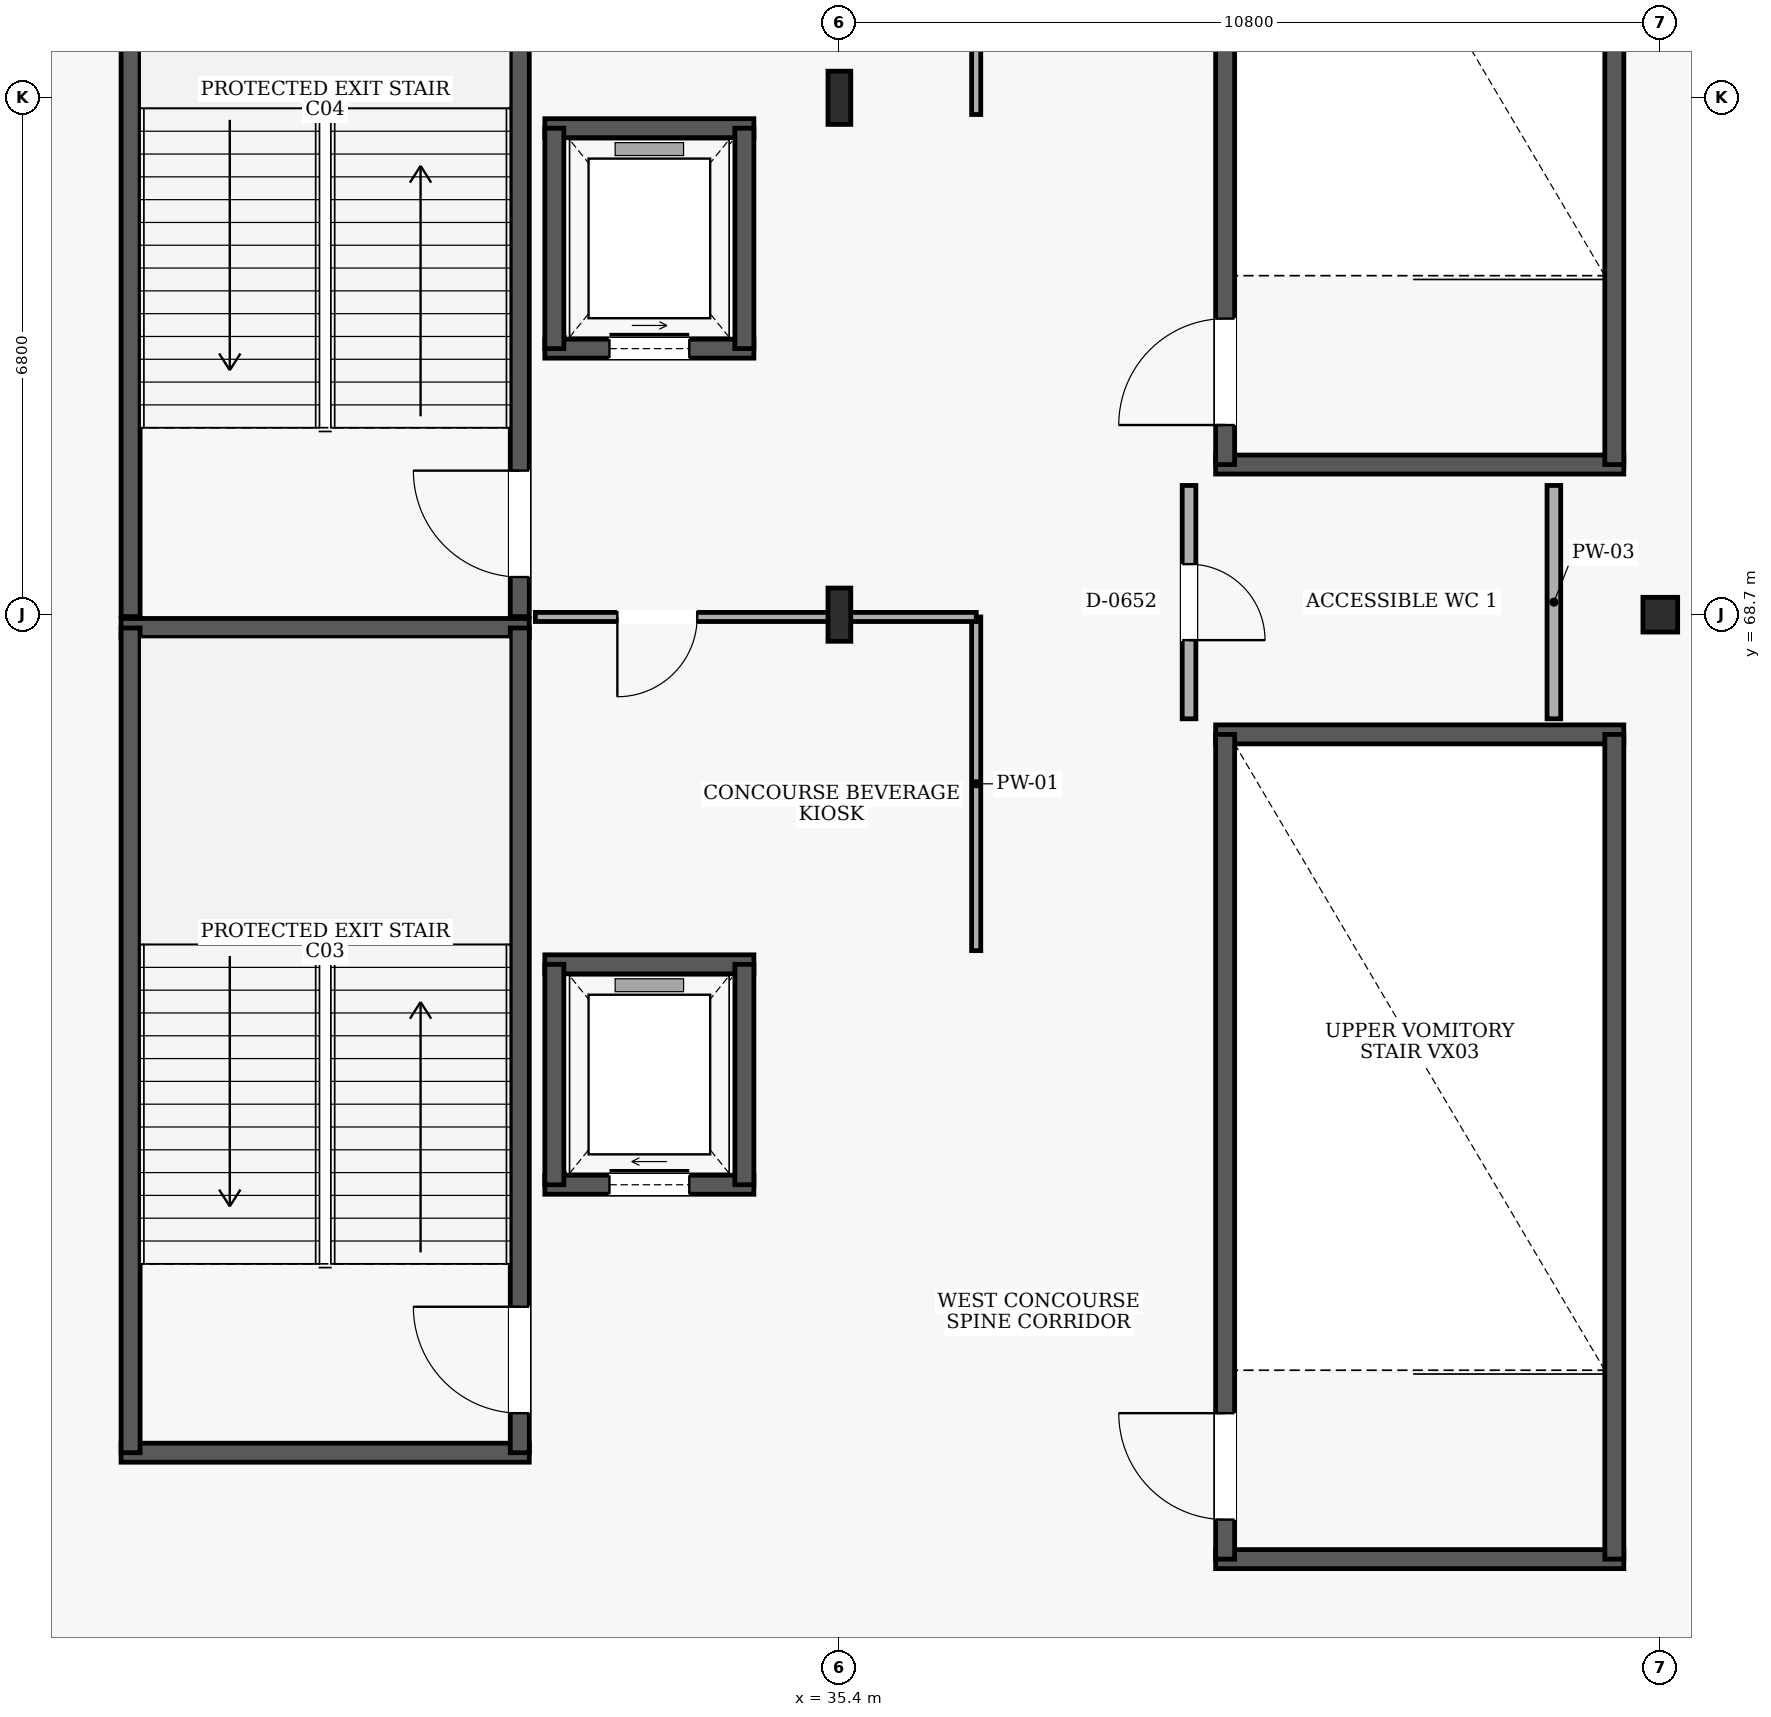
"""IFC4 building model, lengths in metres.
Left out: names, types, materials, properties, quantities, classifications, styles, units other than length and angle.
Written with IfcOpenShell. Run it as: python <this file> out.ifc"""

import sys

from ifc_helpers import new_model, si_unit, direction, frame, frame_2d, origin, origin_2d, place, context, subcontext, project, spatial, rectangle, hollow_circle, i_section, extrude, element, fill, save


model = new_model("IFC4")
c1 = context("Model", 3, precision=1e-05, world=origin(), true_north=direction((0.0, 1.0)))
c2 = subcontext(c1, "Body", "Model", "MODEL_VIEW")
j1 = project(units=[si_unit("LENGTHUNIT", "METRE"), si_unit("PLANEANGLEUNIT", "RADIAN")], contexts=[c1])
p1 = place(None, origin())
s1 = spatial("IfcSite", under=j1, at=p1, CompositionType="ELEMENT")
p2 = place(p1, origin())
s2 = spatial("IfcBuilding", under=s1, at=p2, CompositionType="ELEMENT")
p3 = place(p2, frame((0.0, 0.0, 15.0)))
s3 = spatial("IfcBuildingStorey", under=s2, at=p3, CompositionType="ELEMENT", Elevation=15.0)
for number, where, z_axis, x_axis in (
    (1, (35.4, 68.7, 0.0), (0.0, 0.0, 1.0), (1.0, 0.0, 0.0)),
    (2, (35.4, 75.5, 0.0), (0.0, 0.0, 1.0), (1.0, 0.0, 0.0)),
):
    element("IfcColumn", number, at=place(p3, frame(where, z_axis=z_axis, x_axis=x_axis)), inside=s3, PredefinedType="COLUMN", context=c2, shape_type="SweptSolid", body=[
        extrude(i_section(OverallWidth=0.3, OverallDepth=0.7, WebThickness=0.017, FlangeThickness=0.032, at=origin_2d()), origin(), (0.0, 0.0, 1.0), 4.8),
    ])
p4 = place(p3, frame((46.2, 68.7, 0.0), z_axis=(0.0, 0.0, 1.0), x_axis=(1.0, 0.0, 0.0)))
e3 = element("IfcColumn", 3, at=p4, inside=s3, PredefinedType="COLUMN", context=c2, shape_type="SweptSolid", body=[
    extrude(hollow_circle(Radius=0.229, WallThickness=0.02, at=origin_2d()), origin(), (0.0, 0.0, 1.0), 4.8),
])
for number, where, z_axis, x_axis in (
    (4, (25.95, 57.675, 0.0), (0.0, 0.0, 1.0), (1.0, 0.0, 0.0)),
    (5, (31.32, 68.525, 0.0), (0.0, 0.0, 1.0), (-1.0, 0.0, 0.0)),
):
    element("IfcWall", number, at=place(p3, frame(where, z_axis=z_axis, x_axis=x_axis)), inside=s3, PredefinedType="SHEAR", context=c2, shape_type="SweptSolid", body=[
        extrude(rectangle(XDim=5.37, YDim=0.25, at=frame_2d((2.685, 0.0))), origin(), (0.0, 0.0, 1.0), 4.5),
    ])
p5 = place(p3, frame((26.075, 57.675, 0.0), z_axis=(0.0, 0.0, 1.0), x_axis=(0.0, 1.0, 0.0)))
e6 = element("IfcWall", 6, at=p5, inside=s3, PredefinedType="SHEAR", context=c2, shape_type="SweptSolid", body=[
    extrude(rectangle(XDim=10.85, YDim=0.25, at=frame_2d((5.425, 0.0))), origin(), (0.0, 0.0, 1.0), 4.5),
])
p6 = place(p3, frame((31.195, 57.675, 0.0), z_axis=(0.0, 0.0, 1.0), x_axis=(0.0, 1.0, 0.0)))
e7 = element("IfcWall", 7, at=p6, inside=s3, PredefinedType="SHEAR", context=c2, shape_type="SweptSolid", body=[
    extrude(rectangle(XDim=10.85, YDim=0.25, at=frame_2d((5.425, 0.0))), origin(), (0.0, 0.0, 1.0), 4.5),
])
p7 = place(p6, frame((0.52, 0.0, 0.0)))
e8 = element("IfcOpeningElement", 8, at=p7, cuts=e7, PredefinedType="OPENING", context=c2, shape_type="SweptSolid", body=[
    extrude(rectangle(XDim=1.4, YDim=2.15, at=frame_2d((0.7, 1.075))), frame((0.0, 0.135, 0.0), z_axis=(0.0, -1.0, 0.0), x_axis=(1.0, 0.0, 0.0)), (0.0, 0.0, 1.0), 0.27),
])
p8 = place(p3, frame((26.075, 68.675, 0.0), z_axis=(0.0, 0.0, 1.0), x_axis=(0.0, 1.0, 0.0)))
e9 = element("IfcWall", 9, at=p8, inside=s3, PredefinedType="SHEAR", context=c2, shape_type="SweptSolid", body=[
    extrude(rectangle(XDim=10.85, YDim=0.25, at=frame_2d((5.425, 0.0))), origin(), (0.0, 0.0, 1.0), 4.5),
])
p9 = place(p3, frame((31.195, 68.675, 0.0), z_axis=(0.0, 0.0, 1.0), x_axis=(0.0, 1.0, 0.0)))
e10 = element("IfcWall", 10, at=p9, inside=s3, PredefinedType="SHEAR", context=c2, shape_type="SweptSolid", body=[
    extrude(rectangle(XDim=10.85, YDim=0.25, at=frame_2d((5.425, 0.0))), origin(), (0.0, 0.0, 1.0), 4.5),
])
p10 = place(p9, frame((0.52, 0.0, 0.0)))
e11 = element("IfcOpeningElement", 11, at=p10, cuts=e10, PredefinedType="OPENING", context=c2, shape_type="SweptSolid", body=[
    extrude(rectangle(XDim=1.4, YDim=2.15, at=frame_2d((0.7, 1.075))), frame((0.0, 0.135, 0.0), z_axis=(0.0, -1.0, 0.0), x_axis=(1.0, 0.0, 0.0)), (0.0, 0.0, 1.0), 0.27),
])
for number, where, z_axis, x_axis in (
    (12, (40.35, 56.275, 0.0), (0.0, 0.0, 1.0), (1.0, 0.0, 0.0)),
    (13, (45.72, 67.125, 0.0), (0.0, 0.0, 1.0), (-1.0, 0.0, 0.0)),
):
    element("IfcWall", number, at=place(p3, frame(where, z_axis=z_axis, x_axis=x_axis)), inside=s3, PredefinedType="SHEAR", context=c2, shape_type="SweptSolid", body=[
        extrude(rectangle(XDim=5.37, YDim=0.25, at=frame_2d((2.685, 0.0))), origin(), (0.0, 0.0, 1.0), 4.5),
    ])
p11 = place(p3, frame((40.475, 56.275, 0.0), z_axis=(0.0, 0.0, 1.0), x_axis=(0.0, 1.0, 0.0)))
e14 = element("IfcWall", 14, at=p11, inside=s3, PredefinedType="SHEAR", context=c2, shape_type="SweptSolid", body=[
    extrude(rectangle(XDim=10.85, YDim=0.25, at=frame_2d((5.425, 0.0))), origin(), (0.0, 0.0, 1.0), 4.5),
])
p12 = place(p11, frame((0.52, 0.0, 0.0)))
e15 = element("IfcOpeningElement", 15, at=p12, cuts=e14, PredefinedType="OPENING", context=c2, shape_type="SweptSolid", body=[
    extrude(rectangle(XDim=1.4, YDim=2.15, at=frame_2d((0.7, 1.075))), frame((0.0, 0.135, 0.0), z_axis=(0.0, -1.0, 0.0), x_axis=(1.0, 0.0, 0.0)), (0.0, 0.0, 1.0), 0.27),
])
p13 = place(p3, frame((45.595, 56.275, 0.0), z_axis=(0.0, 0.0, 1.0), x_axis=(0.0, 1.0, 0.0)))
e16 = element("IfcWall", 16, at=p13, inside=s3, PredefinedType="SHEAR", context=c2, shape_type="SweptSolid", body=[
    extrude(rectangle(XDim=10.85, YDim=0.25, at=frame_2d((5.425, 0.0))), origin(), (0.0, 0.0, 1.0), 4.5),
])
p14 = place(p3, frame((40.35, 70.675, 0.0), z_axis=(0.0, 0.0, 1.0), x_axis=(1.0, 0.0, 0.0)))
e17 = element("IfcWall", 17, at=p14, inside=s3, PredefinedType="SHEAR", context=c2, shape_type="SweptSolid", body=[
    extrude(rectangle(XDim=5.37, YDim=0.25, at=frame_2d((2.685, 0.0))), origin(), (0.0, 0.0, 1.0), 4.5),
])
p15 = place(p3, frame((40.475, 70.675, 0.0), z_axis=(0.0, 0.0, 1.0), x_axis=(0.0, 1.0, 0.0)))
e18 = element("IfcWall", 18, at=p15, inside=s3, PredefinedType="SHEAR", context=c2, shape_type="SweptSolid", body=[
    extrude(rectangle(XDim=10.85, YDim=0.25, at=frame_2d((5.425, 0.0))), origin(), (0.0, 0.0, 1.0), 4.5),
])
p16 = place(p15, frame((0.52, 0.0, 0.0)))
e19 = element("IfcOpeningElement", 19, at=p16, cuts=e18, PredefinedType="OPENING", context=c2, shape_type="SweptSolid", body=[
    extrude(rectangle(XDim=1.4, YDim=2.15, at=frame_2d((0.7, 1.075))), frame((0.0, 0.135, 0.0), z_axis=(0.0, -1.0, 0.0), x_axis=(1.0, 0.0, 0.0)), (0.0, 0.0, 1.0), 0.27),
])
p17 = place(p3, frame((45.595, 70.675, 0.0), z_axis=(0.0, 0.0, 1.0), x_axis=(0.0, 1.0, 0.0)))
e20 = element("IfcWall", 20, at=p17, inside=s3, PredefinedType="SHEAR", context=c2, shape_type="SweptSolid", body=[
    extrude(rectangle(XDim=10.85, YDim=0.25, at=frame_2d((5.425, 0.0))), origin(), (0.0, 0.0, 1.0), 4.5),
])
p18 = place(p3, frame((31.525, 61.2, 0.0), z_axis=(0.0, 0.0, 1.0), x_axis=(1.0, 0.0, 0.0)))
e21 = element("IfcWall", 21, at=p18, inside=s3, PredefinedType="SHEAR", context=c2, shape_type="SweptSolid", body=[
    extrude(rectangle(XDim=2.75, YDim=0.25, at=frame_2d((1.375, 0.0))), origin(), (0.0, 0.0, 1.0), 4.5),
])
p19 = place(p18, frame((0.85, 0.0, 0.0)))
e22 = element("IfcOpeningElement", 22, at=p19, cuts=e21, PredefinedType="OPENING", context=c2, shape_type="SweptSolid", body=[
    extrude(rectangle(XDim=1.05, YDim=2.15, at=frame_2d((0.525, 1.075))), frame((0.0, 0.135, 0.0), z_axis=(0.0, -1.0, 0.0), x_axis=(1.0, 0.0, 0.0)), (0.0, 0.0, 1.0), 0.27),
])
p20 = place(p3, frame((34.275, 64.1, 0.0), z_axis=(0.0, 0.0, 1.0), x_axis=(-1.0, 0.0, 0.0)))
e23 = element("IfcWall", 23, at=p20, inside=s3, PredefinedType="SHEAR", context=c2, shape_type="SweptSolid", body=[
    extrude(rectangle(XDim=2.75, YDim=0.25, at=frame_2d((1.375, 0.0))), origin(), (0.0, 0.0, 1.0), 4.5),
])
for number, where, z_axis, x_axis in (
    (24, (31.65, 64.1, 0.0), (0.0, 0.0, 1.0), (0.0, -1.0, 0.0)),
    (25, (34.15, 61.2, 0.0), (0.0, 0.0, 1.0), (0.0, 1.0, 0.0)),
):
    element("IfcWall", number, at=place(p3, frame(where, z_axis=z_axis, x_axis=x_axis)), inside=s3, PredefinedType="SHEAR", context=c2, shape_type="SweptSolid", body=[
        extrude(rectangle(XDim=2.9, YDim=0.25, at=frame_2d((1.45, 0.0))), origin(), (0.0, 0.0, 1.0), 4.5),
    ])
p21 = place(p3, frame((31.525, 72.2, 0.0), z_axis=(0.0, 0.0, 1.0), x_axis=(1.0, 0.0, 0.0)))
e26 = element("IfcWall", 26, at=p21, inside=s3, PredefinedType="SHEAR", context=c2, shape_type="SweptSolid", body=[
    extrude(rectangle(XDim=2.75, YDim=0.25, at=frame_2d((1.375, 0.0))), origin(), (0.0, 0.0, 1.0), 4.5),
])
p22 = place(p21, frame((0.85, 0.0, 0.0)))
e27 = element("IfcOpeningElement", 27, at=p22, cuts=e26, PredefinedType="OPENING", context=c2, shape_type="SweptSolid", body=[
    extrude(rectangle(XDim=1.05, YDim=2.15, at=frame_2d((0.525, 1.075))), frame((0.0, 0.135, 0.0), z_axis=(0.0, -1.0, 0.0), x_axis=(1.0, 0.0, 0.0)), (0.0, 0.0, 1.0), 0.27),
])
p23 = place(p3, frame((34.275, 75.1, 0.0), z_axis=(0.0, 0.0, 1.0), x_axis=(-1.0, 0.0, 0.0)))
e28 = element("IfcWall", 28, at=p23, inside=s3, PredefinedType="SHEAR", context=c2, shape_type="SweptSolid", body=[
    extrude(rectangle(XDim=2.75, YDim=0.25, at=frame_2d((1.375, 0.0))), origin(), (0.0, 0.0, 1.0), 4.5),
])
for number, where, z_axis, x_axis in (
    (29, (31.65, 75.1, 0.0), (0.0, 0.0, 1.0), (0.0, -1.0, 0.0)),
    (30, (34.15, 72.2, 0.0), (0.0, 0.0, 1.0), (0.0, 1.0, 0.0)),
):
    element("IfcWall", number, at=place(p3, frame(where, z_axis=z_axis, x_axis=x_axis)), inside=s3, PredefinedType="SHEAR", context=c2, shape_type="SweptSolid", body=[
        extrude(rectangle(XDim=2.9, YDim=0.25, at=frame_2d((1.45, 0.0))), origin(), (0.0, 0.0, 1.0), 4.5),
    ])
p24 = place(p3, frame((44.8, 67.33, 0.0), z_axis=(0.0, 0.0, 1.0), x_axis=(0.0, 1.0, 0.0)))
e31 = element("IfcWall", 31, at=p24, inside=s3, PredefinedType="PARTITIONING", context=c2, shape_type="SweptSolid", body=[
    extrude(rectangle(XDim=3.07, YDim=0.18, at=frame_2d((1.535, 0.0))), origin(), (0.0, 0.0, 1.0), 4.5),
])
p25 = place(p3, frame((40.0, 70.4, 0.0), z_axis=(0.0, 0.0, 1.0), x_axis=(0.0, -1.0, 0.0)))
e32 = element("IfcWall", 32, at=p25, inside=s3, PredefinedType="PARTITIONING", context=c2, shape_type="SweptSolid", body=[
    extrude(rectangle(XDim=3.07, YDim=0.18, at=frame_2d((1.535, 0.0))), origin(), (0.0, 0.0, 1.0), 4.5),
])
p26 = place(p25, frame((1.035, 0.0, 0.0)))
e33 = element("IfcOpeningElement", 33, at=p26, cuts=e32, PredefinedType="OPENING", context=c2, shape_type="SweptSolid", body=[
    extrude(rectangle(XDim=1.0, YDim=2.1, at=frame_2d((0.5, 1.05))), frame((0.0, 0.1, 0.0), z_axis=(0.0, -1.0, 0.0), x_axis=(1.0, 0.0, 0.0)), (0.0, 0.0, 1.0), 0.2),
])
p27 = place(p3, frame((37.2, 64.28, 0.0), z_axis=(0.0, 0.0, 1.0), x_axis=(0.0, 1.0, 0.0)))
e34 = element("IfcWall", 34, at=p27, inside=s3, PredefinedType="PARTITIONING", context=c2, shape_type="SweptSolid", body=[
    extrude(rectangle(XDim=4.39, YDim=0.12, at=frame_2d((2.195, 0.0))), origin(), (0.0, 0.0, 1.0), 4.5),
])
p28 = place(p3, frame((37.2, 68.67, 0.0), z_axis=(0.0, 0.0, 1.0), x_axis=(-1.0, 0.0, 0.0)))
e35 = element("IfcWall", 35, at=p28, inside=s3, PredefinedType="PARTITIONING", context=c2, shape_type="SweptSolid", body=[
    extrude(rectangle(XDim=5.8, YDim=0.12, at=frame_2d((2.9, 0.0))), origin(), (0.0, 0.0, 1.0), 3.68),
])
p29 = place(p28, frame((3.671, 0.0, 0.0)))
e36 = element("IfcOpeningElement", 36, at=p29, cuts=e35, PredefinedType="OPENING", context=c2, shape_type="SweptSolid", body=[
    extrude(rectangle(XDim=1.05, YDim=2.15, at=frame_2d((0.525, 1.075))), frame((0.0, 0.07, 0.0), z_axis=(0.0, -1.0, 0.0), x_axis=(1.0, 0.0, 0.0)), (0.0, 0.0, 1.0), 0.14),
])
p30 = place(p3, frame((37.2, 75.28, 0.0), z_axis=(0.0, 0.0, 1.0), x_axis=(0.0, 1.0, 0.0)))
e37 = element("IfcWall", 37, at=p30, inside=s3, PredefinedType="PARTITIONING", context=c2, shape_type="SweptSolid", body=[
    extrude(rectangle(XDim=4.45, YDim=0.12, at=frame_2d((2.225, 0.0))), origin(), (0.0, 0.0, 1.0), 4.5),
])
p31 = place(p30, frame((2.237, 0.0, 0.0)))
e38 = element("IfcOpeningElement", 38, at=p31, cuts=e37, PredefinedType="OPENING", context=c2, shape_type="SweptSolid", body=[
    extrude(rectangle(XDim=1.2, YDim=2.15, at=frame_2d((0.6, 1.075))), frame((0.0, 0.07, 0.0), z_axis=(0.0, -1.0, 0.0), x_axis=(1.0, 0.0, 0.0)), (0.0, 0.0, 1.0), 0.14),
])
p32 = place(p7, origin())
e39 = element("IfcDoor", 39, at=p32, inside=s3, OperationType="SINGLE_SWING_RIGHT", PredefinedType="DOOR", context=c2, shape_type="SweptSolid", body=[
    extrude(rectangle(XDim=1.4, YDim=2.15, at=frame_2d((0.7, 1.075))), frame((0.0, 0.025, 0.0), z_axis=(0.0, -1.0, 0.0), x_axis=(1.0, 0.0, 0.0)), (0.0, 0.0, 1.0), 0.05),
])
fill(e8, e39)
p33 = place(p10, origin())
e40 = element("IfcDoor", 40, at=p33, inside=s3, OperationType="SINGLE_SWING_RIGHT", PredefinedType="DOOR", context=c2, shape_type="SweptSolid", body=[
    extrude(rectangle(XDim=1.4, YDim=2.15, at=frame_2d((0.7, 1.075))), frame((0.0, 0.025, 0.0), z_axis=(0.0, -1.0, 0.0), x_axis=(1.0, 0.0, 0.0)), (0.0, 0.0, 1.0), 0.05),
])
fill(e11, e40)
p34 = place(p12, frame((1.4, 0.0, 0.0), z_axis=(0.0, 0.0, 1.0), x_axis=(-1.0, 0.0, 0.0)))
e41 = element("IfcDoor", 41, at=p34, inside=s3, OperationType="SINGLE_SWING_LEFT", PredefinedType="DOOR", context=c2, shape_type="SweptSolid", body=[
    extrude(rectangle(XDim=1.4, YDim=2.15, at=frame_2d((0.7, 1.075))), frame((0.0, 0.025, 0.0), z_axis=(0.0, -1.0, 0.0), x_axis=(1.0, 0.0, 0.0)), (0.0, 0.0, 1.0), 0.05),
])
fill(e15, e41)
p35 = place(p16, frame((1.4, 0.0, 0.0), z_axis=(0.0, 0.0, 1.0), x_axis=(-1.0, 0.0, 0.0)))
e42 = element("IfcDoor", 42, at=p35, inside=s3, OperationType="SINGLE_SWING_RIGHT", PredefinedType="DOOR", context=c2, shape_type="SweptSolid", body=[
    extrude(rectangle(XDim=1.4, YDim=2.15, at=frame_2d((0.7, 1.075))), frame((0.0, 0.025, 0.0), z_axis=(0.0, -1.0, 0.0), x_axis=(1.0, 0.0, 0.0)), (0.0, 0.0, 1.0), 0.05),
])
fill(e19, e42)
p36 = place(p19, origin())
e43 = element("IfcDoor", 43, at=p36, inside=s3, OperationType="SLIDING_TO_RIGHT", PredefinedType="DOOR", context=c2, shape_type="SweptSolid", body=[
    extrude(rectangle(XDim=1.05, YDim=2.15, at=frame_2d((0.525, 1.075))), frame((0.0, 0.025, 0.0), z_axis=(0.0, -1.0, 0.0), x_axis=(1.0, 0.0, 0.0)), (0.0, 0.0, 1.0), 0.05),
])
fill(e22, e43)
p37 = place(p22, origin())
e44 = element("IfcDoor", 44, at=p37, inside=s3, OperationType="SLIDING_TO_LEFT", PredefinedType="DOOR", context=c2, shape_type="SweptSolid", body=[
    extrude(rectangle(XDim=1.05, YDim=2.15, at=frame_2d((0.525, 1.075))), frame((0.0, 0.025, 0.0), z_axis=(0.0, -1.0, 0.0), x_axis=(1.0, 0.0, 0.0)), (0.0, 0.0, 1.0), 0.05),
])
fill(e27, e44)
p38 = place(p26, origin())
e45 = element("IfcDoor", 45, at=p38, inside=s3, OperationType="SINGLE_SWING_RIGHT", PredefinedType="DOOR", context=c2, shape_type="SweptSolid", body=[
    extrude(rectangle(XDim=1.0, YDim=2.1, at=frame_2d((0.5, 1.05))), frame((0.0, 0.025, 0.0), z_axis=(0.0, -1.0, 0.0), x_axis=(1.0, 0.0, 0.0)), (0.0, 0.0, 1.0), 0.05),
])
fill(e33, e45)
p39 = place(p29, origin())
e46 = element("IfcDoor", 46, at=p39, inside=s3, OperationType="SINGLE_SWING_RIGHT", PredefinedType="DOOR", context=c2, shape_type="SweptSolid", body=[
    extrude(rectangle(XDim=1.05, YDim=2.15, at=frame_2d((0.525, 1.075))), frame((0.0, 0.025, 0.0), z_axis=(0.0, -1.0, 0.0), x_axis=(1.0, 0.0, 0.0)), (0.0, 0.0, 1.0), 0.05),
])
fill(e36, e46)
save(model, sys.argv[1])
